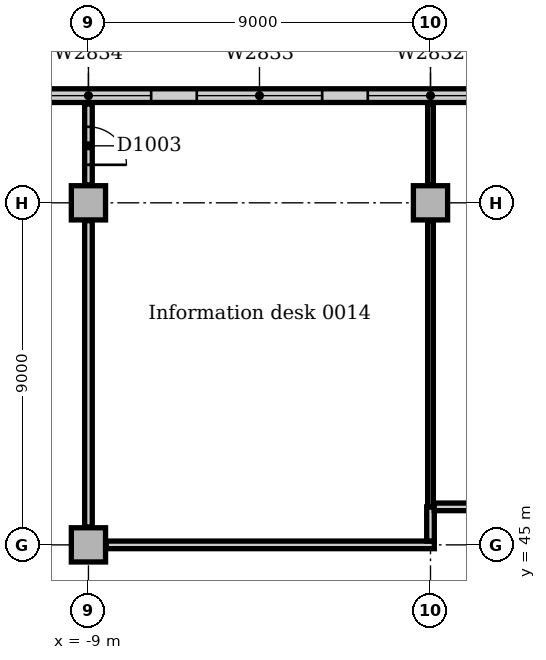
"""IFC4 building model, lengths in metres.
Left out: names, types, materials, properties, quantities, classifications, styles, units other than length and angle.
Written with IfcOpenShell. Run it as: python <this file> out.ifc"""

import sys

from ifc_helpers import new_model, si_unit, direction, frame, frame_2d, origin, origin_2d, place, context, subcontext, project, spatial, rectangle, extrude, element, fill, save


model = new_model("IFC4")
c1 = context("Model", 3, precision=1e-05, world=origin(), true_north=direction((0.0, 1.0)))
c2 = subcontext(c1, "Body", "Model", "MODEL_VIEW")
j1 = project(units=[si_unit("LENGTHUNIT", "METRE"), si_unit("PLANEANGLEUNIT", "RADIAN")], contexts=[c1])
p1 = place(None, origin())
s1 = spatial("IfcSite", under=j1, at=p1, CompositionType="ELEMENT")
p2 = place(p1, origin())
s2 = spatial("IfcBuilding", under=s1, at=p2, CompositionType="ELEMENT")
p3 = place(p2, origin())
s3 = spatial("IfcBuildingStorey", under=s2, at=p3, CompositionType="ELEMENT", Elevation=0.0)
for number, where, z_axis, x_axis in (
    (1, (-9.0, 45.0, 0.0), (0.0, 0.0, 1.0), (1.0, 0.0, 0.0)),
    (2, (-9.0, 54.0, 0.0), (0.0, 0.0, 1.0), (1.0, 0.0, 0.0)),
    (3, (0.0, 54.0, 0.0), (0.0, 0.0, 1.0), (1.0, 0.0, 0.0)),
):
    element("IfcColumn", number, at=place(p3, frame(where, z_axis=z_axis, x_axis=x_axis)), inside=s3, PredefinedType="COLUMN", context=c2, shape_type="SweptSolid", body=[
        extrude(rectangle(XDim=0.9, YDim=0.9, at=origin_2d()), origin(), (0.0, 0.0, 1.0), 5.7),
    ])
p4 = place(p3, frame((3.4, 56.82, 0.0), z_axis=(0.0, 0.0, 1.0), x_axis=(-1.0, 0.0, 0.0)))
e4 = element("IfcWall", 4, at=p4, inside=s3, PredefinedType="STANDARD", context=c2, shape_type="SweptSolid", body=[
    extrude(rectangle(XDim=84.4, YDim=0.36, at=frame_2d((42.2, 0.0))), origin(), (0.0, 0.0, 1.0), 5.7),
])
p5 = place(p4, frame((15.7, 0.0, 0.0)))
e5 = element("IfcOpeningElement", 5, at=p5, cuts=e4, PredefinedType="OPENING", context=c2, shape_type="SweptSolid", body=[
    extrude(rectangle(XDim=2.4, YDim=2.4, at=frame_2d((1.2, 1.2))), frame((0.0, 0.19, 0.0), z_axis=(0.0, -1.0, 0.0), x_axis=(1.0, 0.0, 0.0)), (0.0, 0.0, 1.0), 0.38),
])
p6 = place(p4, frame((76.6, 0.0, 0.0)))
e6 = element("IfcOpeningElement", 6, at=p6, cuts=e4, PredefinedType="OPENING", context=c2, shape_type="SweptSolid", body=[
    extrude(rectangle(XDim=6.6, YDim=4.2, at=frame_2d((3.3, 2.1))), frame((0.0, 0.19, 0.0), z_axis=(0.0, -1.0, 0.0), x_axis=(1.0, 0.0, 0.0)), (0.0, 0.0, 1.0), 0.38),
])
p7 = place(p4, frame((59.65, 0.0, 0.0)))
e7 = element("IfcOpeningElement", 7, at=p7, cuts=e4, PredefinedType="OPENING", context=c2, shape_type="SweptSolid", body=[
    extrude(rectangle(XDim=4.5, YDim=4.2, at=frame_2d((2.25, 2.1))), frame((0.0, 0.19, 0.0), z_axis=(0.0, -1.0, 0.0), x_axis=(1.0, 0.0, 0.0)), (0.0, 0.0, 1.0), 0.38),
])
p8 = place(p4, frame((58.3, 0.0, 0.0)))
e8 = element("IfcOpeningElement", 8, at=p8, cuts=e4, PredefinedType="OPENING", context=c2, shape_type="SweptSolid", body=[
    extrude(rectangle(XDim=1.2, YDim=2.2, at=frame_2d((0.6, 1.1))), frame((0.0, 0.19, 0.0), z_axis=(0.0, -1.0, 0.0), x_axis=(1.0, 0.0, 0.0)), (0.0, 0.0, 1.0), 0.38),
])
p9 = place(p4, frame((70.0, 0.0, 0.0)))
e9 = element("IfcOpeningElement", 9, at=p9, cuts=e4, PredefinedType="OPENING", context=c2, shape_type="SweptSolid", body=[
    extrude(rectangle(XDim=1.8, YDim=2.2, at=frame_2d((0.9, 1.1))), frame((0.0, 0.19, 0.0), z_axis=(0.0, -1.0, 0.0), x_axis=(1.0, 0.0, 0.0)), (0.0, 0.0, 1.0), 0.38),
])
p10 = place(p4, frame((52.0, 0.0, 0.0)))
e10 = element("IfcOpeningElement", 10, at=p10, cuts=e4, PredefinedType="OPENING", context=c2, shape_type="SweptSolid", body=[
    extrude(rectangle(XDim=1.8, YDim=2.2, at=frame_2d((0.9, 1.1))), frame((0.0, 0.19, 0.0), z_axis=(0.0, -1.0, 0.0), x_axis=(1.0, 0.0, 0.0)), (0.0, 0.0, 1.0), 0.38),
])
p11 = place(p4, frame((1.75, 0.0, 0.6)))
e11 = element("IfcOpeningElement", 11, at=p11, cuts=e4, PredefinedType="OPENING", context=c2, shape_type="SweptSolid", body=[
    extrude(rectangle(XDim=3.3, YDim=3.0, at=frame_2d((1.65, 1.5))), frame((0.0, 0.19, 0.0), z_axis=(0.0, -1.0, 0.0), x_axis=(1.0, 0.0, 0.0)), (0.0, 0.0, 1.0), 0.38),
])
p12 = place(p4, frame((6.25, 0.0, 0.6)))
e12 = element("IfcOpeningElement", 12, at=p12, cuts=e4, PredefinedType="OPENING", context=c2, shape_type="SweptSolid", body=[
    extrude(rectangle(XDim=3.3, YDim=3.0, at=frame_2d((1.65, 1.5))), frame((0.0, 0.19, 0.0), z_axis=(0.0, -1.0, 0.0), x_axis=(1.0, 0.0, 0.0)), (0.0, 0.0, 1.0), 0.38),
])
p13 = place(p4, frame((10.75, 0.0, 0.6)))
e13 = element("IfcOpeningElement", 13, at=p13, cuts=e4, PredefinedType="OPENING", context=c2, shape_type="SweptSolid", body=[
    extrude(rectangle(XDim=3.3, YDim=3.0, at=frame_2d((1.65, 1.5))), frame((0.0, 0.19, 0.0), z_axis=(0.0, -1.0, 0.0), x_axis=(1.0, 0.0, 0.0)), (0.0, 0.0, 1.0), 0.38),
])
p14 = place(p4, frame((19.75, 0.0, 0.6)))
e14 = element("IfcOpeningElement", 14, at=p14, cuts=e4, PredefinedType="OPENING", context=c2, shape_type="SweptSolid", body=[
    extrude(rectangle(XDim=3.3, YDim=3.0, at=frame_2d((1.65, 1.5))), frame((0.0, 0.19, 0.0), z_axis=(0.0, -1.0, 0.0), x_axis=(1.0, 0.0, 0.0)), (0.0, 0.0, 1.0), 0.38),
])
p15 = place(p4, frame((24.25, 0.0, 0.6)))
e15 = element("IfcOpeningElement", 15, at=p15, cuts=e4, PredefinedType="OPENING", context=c2, shape_type="SweptSolid", body=[
    extrude(rectangle(XDim=3.3, YDim=3.0, at=frame_2d((1.65, 1.5))), frame((0.0, 0.19, 0.0), z_axis=(0.0, -1.0, 0.0), x_axis=(1.0, 0.0, 0.0)), (0.0, 0.0, 1.0), 0.38),
])
p16 = place(p4, frame((28.75, 0.0, 0.6)))
e16 = element("IfcOpeningElement", 16, at=p16, cuts=e4, PredefinedType="OPENING", context=c2, shape_type="SweptSolid", body=[
    extrude(rectangle(XDim=3.3, YDim=3.0, at=frame_2d((1.65, 1.5))), frame((0.0, 0.19, 0.0), z_axis=(0.0, -1.0, 0.0), x_axis=(1.0, 0.0, 0.0)), (0.0, 0.0, 1.0), 0.38),
])
p17 = place(p4, frame((33.25, 0.0, 0.6)))
e17 = element("IfcOpeningElement", 17, at=p17, cuts=e4, PredefinedType="OPENING", context=c2, shape_type="SweptSolid", body=[
    extrude(rectangle(XDim=3.3, YDim=3.0, at=frame_2d((1.65, 1.5))), frame((0.0, 0.19, 0.0), z_axis=(0.0, -1.0, 0.0), x_axis=(1.0, 0.0, 0.0)), (0.0, 0.0, 1.0), 0.38),
])
p18 = place(p4, frame((37.75, 0.0, 0.6)))
e18 = element("IfcOpeningElement", 18, at=p18, cuts=e4, PredefinedType="OPENING", context=c2, shape_type="SweptSolid", body=[
    extrude(rectangle(XDim=3.3, YDim=3.0, at=frame_2d((1.65, 1.5))), frame((0.0, 0.19, 0.0), z_axis=(0.0, -1.0, 0.0), x_axis=(1.0, 0.0, 0.0)), (0.0, 0.0, 1.0), 0.38),
])
p19 = place(p4, frame((42.25, 0.0, 0.6)))
e19 = element("IfcOpeningElement", 19, at=p19, cuts=e4, PredefinedType="OPENING", context=c2, shape_type="SweptSolid", body=[
    extrude(rectangle(XDim=3.3, YDim=3.0, at=frame_2d((1.65, 1.5))), frame((0.0, 0.19, 0.0), z_axis=(0.0, -1.0, 0.0), x_axis=(1.0, 0.0, 0.0)), (0.0, 0.0, 1.0), 0.38),
])
p20 = place(p4, frame((46.75, 0.0, 0.6)))
e20 = element("IfcOpeningElement", 20, at=p20, cuts=e4, PredefinedType="OPENING", context=c2, shape_type="SweptSolid", body=[
    extrude(rectangle(XDim=3.3, YDim=3.0, at=frame_2d((1.65, 1.5))), frame((0.0, 0.19, 0.0), z_axis=(0.0, -1.0, 0.0), x_axis=(1.0, 0.0, 0.0)), (0.0, 0.0, 1.0), 0.38),
])
p21 = place(p3, frame((-9.0, 45.47, 0.0), z_axis=(0.0, 0.0, 1.0), x_axis=(0.0, 1.0, 0.0)))
e21 = element("IfcWall", 21, at=p21, inside=s3, PredefinedType="PARTITIONING", context=c2, shape_type="SweptSolid", body=[
    extrude(rectangle(XDim=8.06, YDim=0.2, at=frame_2d((4.03, 0.0))), origin(), (0.0, 0.0, 1.0), 5.7),
])
p22 = place(p3, frame((-9.0, 54.47, 0.0), z_axis=(0.0, 0.0, 1.0), x_axis=(0.0, 1.0, 0.0)))
e22 = element("IfcWall", 22, at=p22, inside=s3, PredefinedType="PARTITIONING", context=c2, shape_type="SweptSolid", body=[
    extrude(rectangle(XDim=2.13, YDim=0.2, at=frame_2d((1.065, 0.0))), origin(), (0.0, 0.0, 1.0), 5.7),
])
p23 = place(p22, frame((0.53, 0.0, 0.0)))
e23 = element("IfcOpeningElement", 23, at=p23, cuts=e22, PredefinedType="OPENING", context=c2, shape_type="SweptSolid", body=[
    extrude(rectangle(XDim=1.0, YDim=2.1, at=frame_2d((0.5, 1.05))), frame((0.0, 0.11, 0.0), z_axis=(0.0, -1.0, 0.0), x_axis=(1.0, 0.0, 0.0)), (0.0, 0.0, 1.0), 0.22),
])
p24 = place(p3, frame((-8.53, 45.0, 0.0), z_axis=(0.0, 0.0, 1.0), x_axis=(1.0, 0.0, 0.0)))
e24 = element("IfcWall", 24, at=p24, inside=s3, PredefinedType="PARTITIONING", context=c2, shape_type="SweptSolid", body=[
    extrude(rectangle(XDim=8.63, YDim=0.2, at=frame_2d((4.315, 0.0))), origin(), (0.0, 0.0, 1.0), 5.7),
])
p25 = place(p3, frame((0.0, 45.1, 0.0), z_axis=(0.0, 0.0, 1.0), x_axis=(0.0, 1.0, 0.0)))
e25 = element("IfcWall", 25, at=p25, inside=s3, PredefinedType="PARTITIONING", context=c2, shape_type="SweptSolid", body=[
    extrude(rectangle(XDim=0.9, YDim=0.2, at=frame_2d((0.45, 0.0))), origin(), (0.0, 0.0, 1.0), 5.7),
])
p26 = place(p3, frame((0.0, 46.0, 0.0), z_axis=(0.0, 0.0, 1.0), x_axis=(0.0, 1.0, 0.0)))
e26 = element("IfcWall", 26, at=p26, inside=s3, PredefinedType="PARTITIONING", context=c2, shape_type="SweptSolid", body=[
    extrude(rectangle(XDim=7.53, YDim=0.15, at=frame_2d((3.765, 0.0))), origin(), (0.0, 0.0, 1.0), 5.7),
])
p27 = place(p3, frame((0.0, 54.47, 0.0), z_axis=(0.0, 0.0, 1.0), x_axis=(0.0, 1.0, 0.0)))
e27 = element("IfcWall", 27, at=p27, inside=s3, PredefinedType="PARTITIONING", context=c2, shape_type="SweptSolid", body=[
    extrude(rectangle(XDim=2.13, YDim=0.15, at=frame_2d((1.065, 0.0))), origin(), (0.0, 0.0, 1.0), 5.7),
])
p28 = place(p3, frame((0.1, 46.0, 0.0), z_axis=(0.0, 0.0, 1.0), x_axis=(1.0, 0.0, 0.0)))
e28 = element("IfcWall", 28, at=p28, inside=s3, PredefinedType="PARTITIONING", context=c2, shape_type="SweptSolid", body=[
    extrude(rectangle(XDim=8.9, YDim=0.2, at=frame_2d((4.45, 0.0))), origin(), (0.0, 0.0, 1.0), 5.7),
])
p29 = place(p28, frame((3.9, 0.0, 0.0)))
e29 = element("IfcOpeningElement", 29, at=p29, cuts=e28, PredefinedType="OPENING", context=c2, shape_type="SweptSolid", body=[
    extrude(rectangle(XDim=1.0, YDim=2.1, at=frame_2d((0.5, 1.05))), frame((0.0, 0.11, 0.0), z_axis=(0.0, -1.0, 0.0), x_axis=(1.0, 0.0, 0.0)), (0.0, 0.0, 1.0), 0.22),
])
p30 = place(p11, origin())
e30 = element("IfcWindow", 30, at=p30, inside=s3, PartitioningType="SINGLE_PANEL", PredefinedType="WINDOW", context=c2, shape_type="SweptSolid", body=[
    extrude(rectangle(XDim=3.3, YDim=3.0, at=frame_2d((1.65, 1.5))), frame((0.0, 0.13, 0.0), z_axis=(0.0, -1.0, 0.0), x_axis=(1.0, 0.0, 0.0)), (0.0, 0.0, 1.0), 0.06),
])
fill(e11, e30)
p31 = place(p12, origin())
e31 = element("IfcWindow", 31, at=p31, inside=s3, PartitioningType="SINGLE_PANEL", PredefinedType="WINDOW", context=c2, shape_type="SweptSolid", body=[
    extrude(rectangle(XDim=3.3, YDim=3.0, at=frame_2d((1.65, 1.5))), frame((0.0, 0.13, 0.0), z_axis=(0.0, -1.0, 0.0), x_axis=(1.0, 0.0, 0.0)), (0.0, 0.0, 1.0), 0.06),
])
fill(e12, e31)
p32 = place(p13, origin())
e32 = element("IfcWindow", 32, at=p32, inside=s3, PartitioningType="SINGLE_PANEL", PredefinedType="WINDOW", context=c2, shape_type="SweptSolid", body=[
    extrude(rectangle(XDim=3.3, YDim=3.0, at=frame_2d((1.65, 1.5))), frame((0.0, 0.13, 0.0), z_axis=(0.0, -1.0, 0.0), x_axis=(1.0, 0.0, 0.0)), (0.0, 0.0, 1.0), 0.06),
])
fill(e13, e32)
p33 = place(p23, frame((1.0, 0.0, 0.0), z_axis=(0.0, 0.0, 1.0), x_axis=(-1.0, 0.0, 0.0)))
e33 = element("IfcDoor", 33, at=p33, inside=s3, OperationType="SINGLE_SWING_RIGHT", PredefinedType="DOOR", context=c2, shape_type="SweptSolid", body=[
    extrude(rectangle(XDim=1.0, YDim=2.1, at=frame_2d((0.5, 1.05))), frame((0.0, 0.025, 0.0), z_axis=(0.0, -1.0, 0.0), x_axis=(1.0, 0.0, 0.0)), (0.0, 0.0, 1.0), 0.05),
])
fill(e23, e33)
save(model, sys.argv[1])
